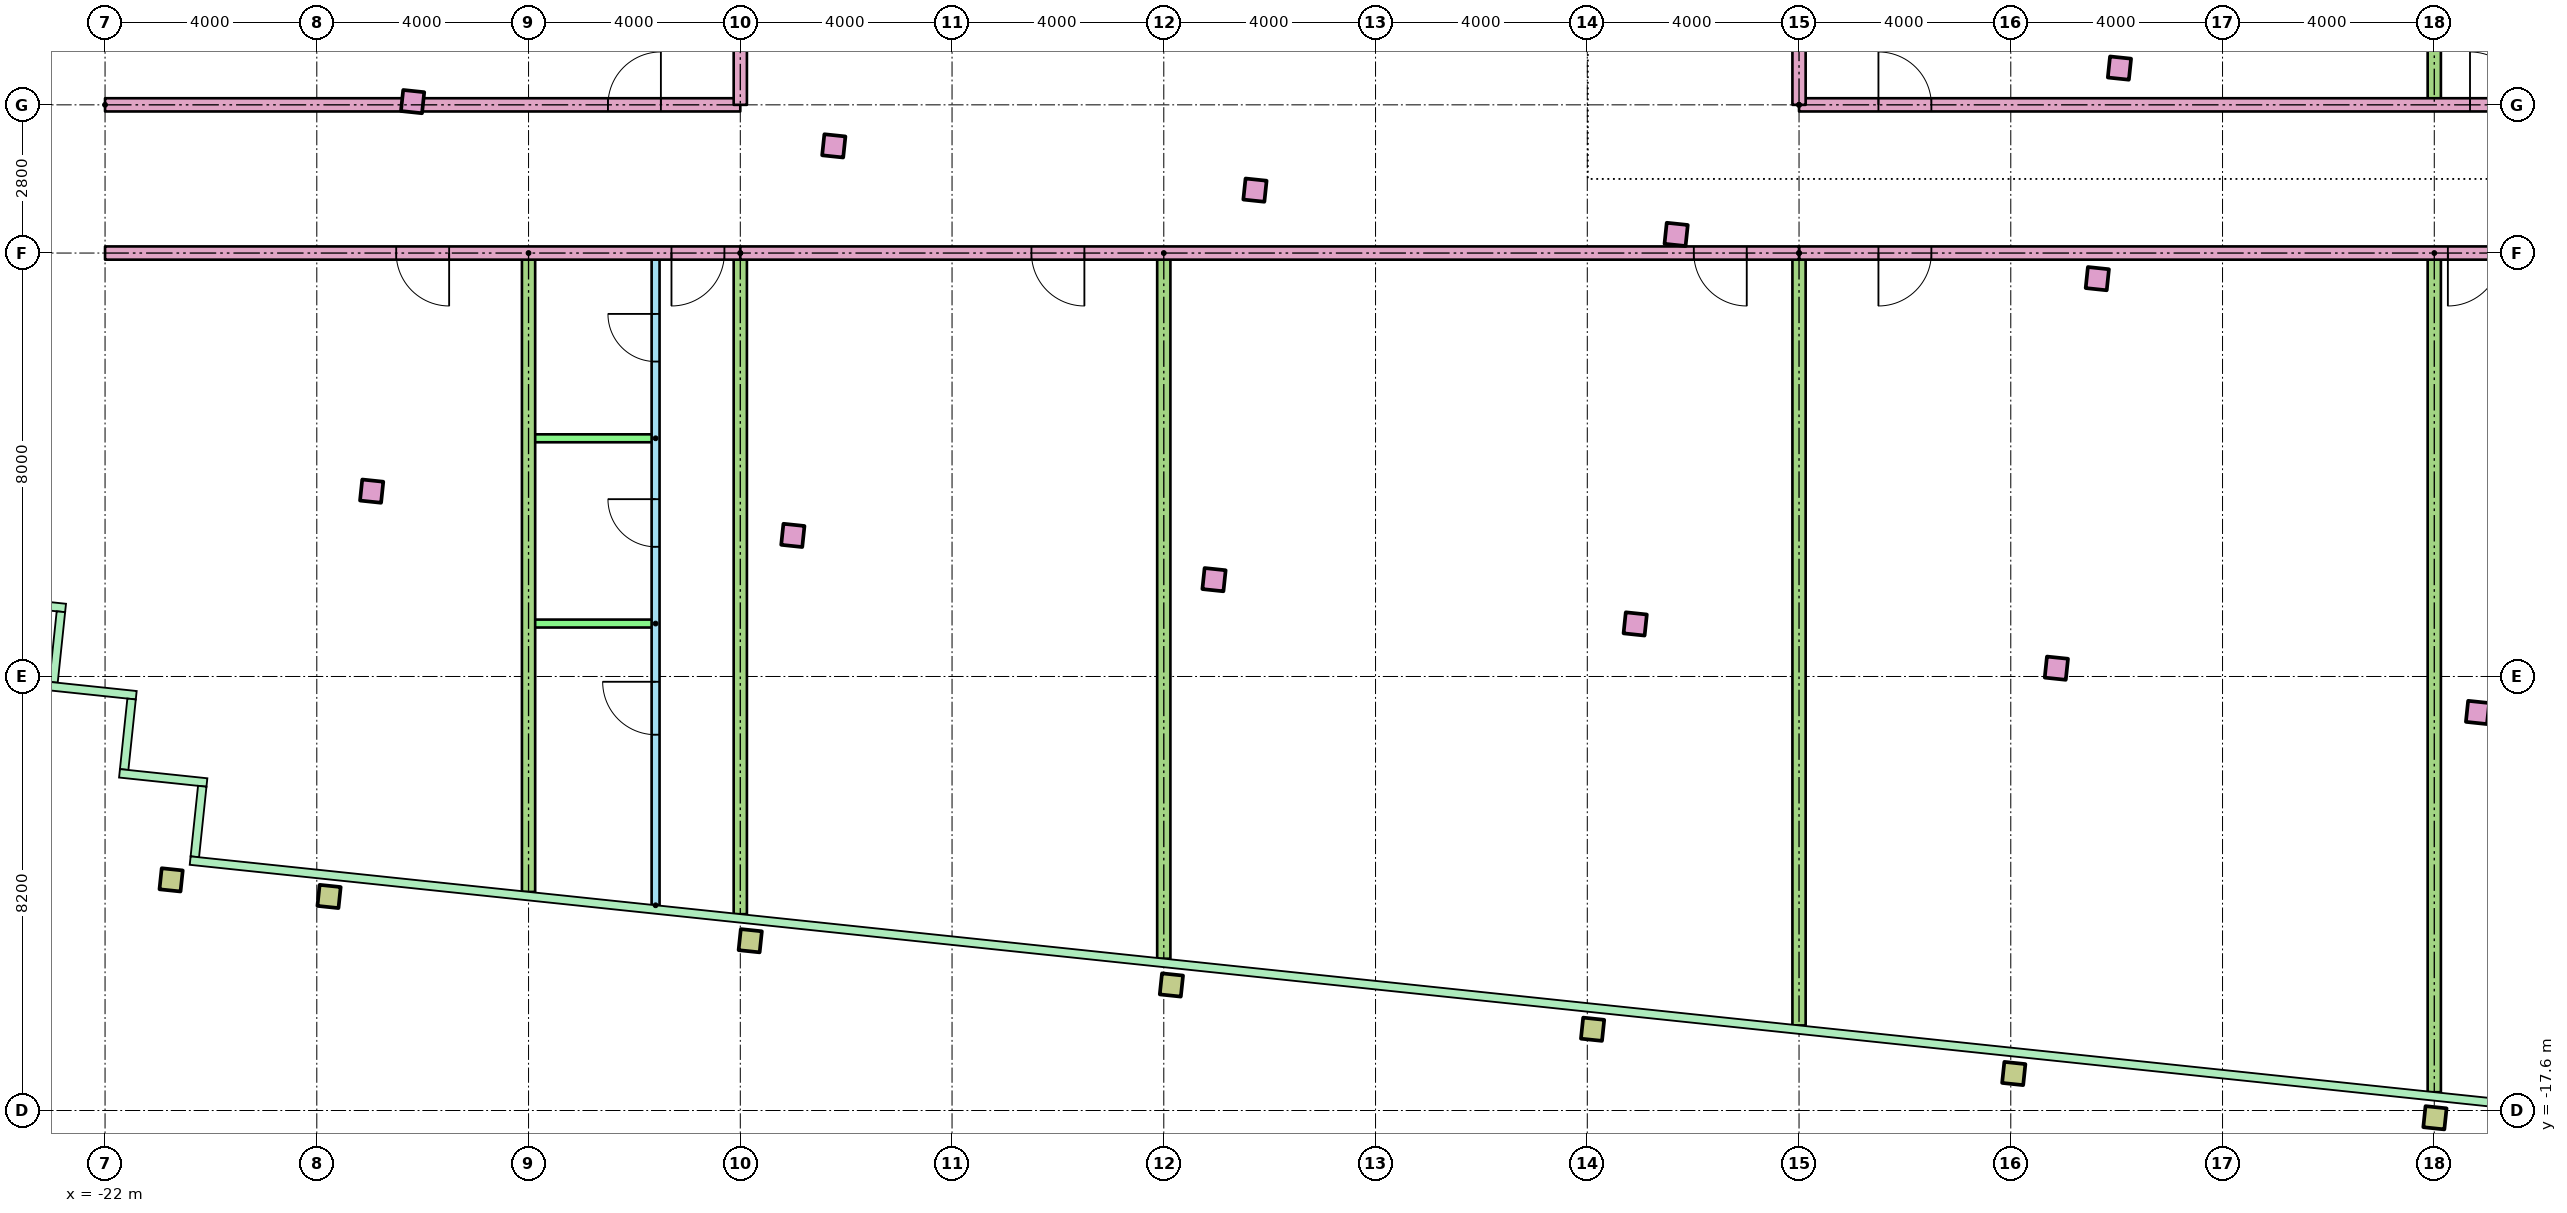
"""IFC4 building model, lengths in metres.
Left out: names, types, materials, properties, quantities, classifications, styles, units other than length and angle.
Written with IfcOpenShell. Run it as: python <this file> out.ifc"""

import sys

from ifc_helpers import new_model, si_unit, direction, frame, frame_2d, origin, origin_2d, place, context, subcontext, project, spatial, rectangle, hollow_rectangle, extrude, element, fill, save


model = new_model("IFC4")
c1 = context("Model", 3, precision=1e-05, world=origin(), true_north=direction((0.0, 1.0)))
c2 = subcontext(c1, "Body", "Model", "MODEL_VIEW")
j1 = project(units=[si_unit("LENGTHUNIT", "METRE"), si_unit("PLANEANGLEUNIT", "RADIAN")], contexts=[c1])
p1 = place(None, origin())
s1 = spatial("IfcSite", under=j1, at=p1, CompositionType="ELEMENT")
p2 = place(p1, origin())
s2 = spatial("IfcBuilding", under=s1, at=p2, CompositionType="ELEMENT")
p3 = place(p2, frame((0.0, 0.0, 298.3)))
s3 = spatial("IfcBuildingStorey", under=s2, at=p3, CompositionType="ELEMENT", Elevation=298.3)
for number, where, z_axis, x_axis in (
    (1, (-20.752, -13.243, 0.0), (0.0, 0.0, 1.0), (0.995, -0.105, 0.0)),
    (2, (-17.768, -13.556, 0.0), (0.0, 0.0, 1.0), (0.995, -0.105, 0.0)),
    (3, (-9.812, -14.392, 0.0), (0.0, 0.0, 1.0), (0.995, -0.105, 0.0)),
    (4, (-1.856, -15.229, 0.0), (0.0, 0.0, 1.0), (0.995, -0.105, 0.0)),
    (5, (6.1, -16.065, 0.0), (0.0, 0.0, 1.0), (0.995, -0.105, 0.0)),
    (6, (14.056, -16.901, 0.0), (0.0, 0.0, 1.0), (0.995, -0.105, 0.0)),
    (7, (22.012, -17.737, 0.0), (0.0, 0.0, 1.0), (0.995, -0.105, 0.0)),
):
    element("IfcColumn", number, at=place(p3, frame(where, z_axis=z_axis, x_axis=x_axis)), inside=s3, PredefinedType="COLUMN", context=c2, shape_type="SweptSolid", body=[
        extrude(hollow_rectangle(XDim=0.4, YDim=0.4, WallThickness=0.02, at=origin_2d()), origin(), (0.0, 0.0, 1.0), 3.4),
    ])
for number, where, z_axis, x_axis in (
    (8, (-16.964, -5.898, 0.0), (0.0, 0.0, 1.0), (0.995, -0.105, 0.0)),
    (9, (-9.007, -6.735, 0.0), (0.0, 0.0, 1.0), (0.995, -0.105, 0.0)),
    (10, (-1.051, -7.571, 0.0), (0.0, 0.0, 1.0), (0.995, -0.105, 0.0)),
    (11, (6.905, -8.407, 0.0), (0.0, 0.0, 1.0), (0.995, -0.105, 0.0)),
    (12, (14.861, -9.243, 0.0), (0.0, 0.0, 1.0), (0.995, -0.105, 0.0)),
    (13, (22.817, -10.08, 0.0), (0.0, 0.0, 1.0), (0.995, -0.105, 0.0)),
    (14, (-16.19, 1.461, 0.0), (0.0, 0.0, 1.0), (0.995, -0.105, 0.0)),
    (15, (-8.234, 0.625, 0.0), (0.0, 0.0, 1.0), (0.995, -0.105, 0.0)),
    (16, (-0.278, -0.211, 0.0), (0.0, 0.0, 1.0), (0.995, -0.105, 0.0)),
    (17, (7.678, -1.048, 0.0), (0.0, 0.0, 1.0), (0.995, -0.105, 0.0)),
    (18, (15.635, -1.884, 0.0), (0.0, 0.0, 1.0), (0.995, -0.105, 0.0)),
    (19, (16.053, 2.094, 0.0), (0.0, 0.0, 1.0), (0.995, -0.105, 0.0)),
):
    element("IfcColumn", number, at=place(p3, frame(where, z_axis=z_axis, x_axis=x_axis)), inside=s3, PredefinedType="COLUMN", context=c2, shape_type="SweptSolid", body=[
        extrude(rectangle(XDim=0.4, YDim=0.4, at=origin_2d()), origin(), (0.0, 0.0, 1.0), 3.4),
    ])
p4 = place(p3, frame((-10.0, -1.4, 0.0), z_axis=(0.0, 0.0, 1.0), x_axis=(-1.0, 0.0, 0.0)))
e20 = element("IfcWall", 20, at=p4, inside=s3, PredefinedType="PARTITIONING", context=c2, shape_type="SweptSolid", body=[
    extrude(rectangle(XDim=12.0, YDim=0.25, at=frame_2d((6.0, 0.0))), origin(), (0.0, 0.0, 1.0), 2.6),
])
p5 = place(p4, frame((0.3, 0.0, 0.0)))
e21 = element("IfcOpeningElement", 21, at=p5, cuts=e20, PredefinedType="OPENING", context=c2, shape_type="SweptSolid", body=[
    extrude(rectangle(XDim=1.0, YDim=2.1, at=frame_2d((0.5, 1.05))), frame((0.0, 0.135, 0.0), z_axis=(0.0, -1.0, 0.0), x_axis=(1.0, 0.0, 0.0)), (0.0, 0.0, 1.0), 0.27),
])
p6 = place(p4, frame((5.5, 0.0, 0.0)))
e22 = element("IfcOpeningElement", 22, at=p6, cuts=e20, PredefinedType="OPENING", context=c2, shape_type="SweptSolid", body=[
    extrude(rectangle(XDim=1.0, YDim=2.1, at=frame_2d((0.5, 1.05))), frame((0.0, 0.135, 0.0), z_axis=(0.0, -1.0, 0.0), x_axis=(1.0, 0.0, 0.0)), (0.0, 0.0, 1.0), 0.27),
])
p7 = place(p3, frame((-11.6, -13.723, 0.0), z_axis=(0.0, 0.0, 1.0), x_axis=(0.0, 1.0, 0.0)))
e23 = element("IfcWall", 23, at=p7, inside=s3, PredefinedType="PARTITIONING", context=c2, shape_type="SweptSolid", body=[
    extrude(rectangle(XDim=12.323, YDim=0.15, at=frame_2d((6.162, 0.0))), origin(), (0.0, 0.0, 1.0), 2.6),
])
p8 = place(p7, frame((10.273, 0.0, 0.0)))
e24 = element("IfcOpeningElement", 24, at=p8, cuts=e23, PredefinedType="OPENING", context=c2, shape_type="SweptSolid", body=[
    extrude(rectangle(XDim=0.9, YDim=2.1, at=frame_2d((0.45, 1.05))), frame((0.0, 0.085, 0.0), z_axis=(0.0, -1.0, 0.0), x_axis=(1.0, 0.0, 0.0)), (0.0, 0.0, 1.0), 0.17),
])
p9 = place(p7, frame((6.773, 0.0, 0.0)))
e25 = element("IfcOpeningElement", 25, at=p9, cuts=e23, PredefinedType="OPENING", context=c2, shape_type="SweptSolid", body=[
    extrude(rectangle(XDim=0.9, YDim=2.1, at=frame_2d((0.45, 1.05))), frame((0.0, 0.085, 0.0), z_axis=(0.0, -1.0, 0.0), x_axis=(1.0, 0.0, 0.0)), (0.0, 0.0, 1.0), 0.17),
])
p10 = place(p7, frame((3.223, 0.0, 0.0)))
e26 = element("IfcOpeningElement", 26, at=p10, cuts=e23, PredefinedType="OPENING", context=c2, shape_type="SweptSolid", body=[
    extrude(rectangle(XDim=1.0, YDim=2.1, at=frame_2d((0.5, 1.05))), frame((0.0, 0.085, 0.0), z_axis=(0.0, -1.0, 0.0), x_axis=(1.0, 0.0, 0.0)), (0.0, 0.0, 1.0), 0.17),
])
for number, where, z_axis, x_axis in (
    (27, (-11.6, -4.9, 0.0), (0.0, 0.0, 1.0), (-1.0, 0.0, 0.0)),
    (28, (-11.6, -8.4, 0.0), (0.0, 0.0, 1.0), (-1.0, 0.0, 0.0)),
):
    element("IfcWall", number, at=place(p3, frame(where, z_axis=z_axis, x_axis=x_axis)), inside=s3, PredefinedType="PARTITIONING", context=c2, shape_type="SweptSolid", body=[
        extrude(rectangle(XDim=2.4, YDim=0.15, at=frame_2d((1.2, 0.0))), origin(), (0.0, 0.0, 1.0), 2.6),
    ])
p11 = place(p3, frame((-14.0, -1.4, 0.0), z_axis=(0.0, 0.0, 1.0), x_axis=(0.0, -1.0, 0.0)))
e29 = element("IfcWall", 29, at=p11, inside=s3, PredefinedType="PARTITIONING", context=c2, shape_type="SweptSolid", body=[
    extrude(rectangle(XDim=12.071, YDim=0.25, at=frame_2d((6.035, 0.0))), origin(), (0.0, 0.0, 1.0), 2.6),
])
p12 = place(p3, frame((-10.0, -1.4, 0.0), z_axis=(0.0, 0.0, 1.0), x_axis=(0.0, -1.0, 0.0)))
e30 = element("IfcWall", 30, at=p12, inside=s3, PredefinedType="PARTITIONING", context=c2, shape_type="SweptSolid", body=[
    extrude(rectangle(XDim=12.491, YDim=0.25, at=frame_2d((6.246, 0.0))), origin(), (0.0, 0.0, 1.0), 2.6),
])
p13 = place(p3, frame((-22.0, 1.4, 0.0)))
e31 = element("IfcWall", 31, at=p13, inside=s3, PredefinedType="PARTITIONING", context=c2, shape_type="SweptSolid", body=[
    extrude(rectangle(XDim=12.0, YDim=0.25, at=frame_2d((6.0, 0.0))), origin(), (0.0, 0.0, 1.0), 2.6),
])
p14 = place(p13, frame((9.5, 0.0, 0.0)))
e32 = element("IfcOpeningElement", 32, at=p14, cuts=e31, PredefinedType="OPENING", context=c2, shape_type="SweptSolid", body=[
    extrude(rectangle(XDim=1.0, YDim=2.1, at=frame_2d((0.5, 1.05))), frame((0.0, 0.135, 0.0), z_axis=(0.0, -1.0, 0.0), x_axis=(1.0, 0.0, 0.0)), (0.0, 0.0, 1.0), 0.27),
])
p15 = place(p3, frame((25.0, -1.4, 0.0), z_axis=(0.0, 0.0, 1.0), x_axis=(-1.0, 0.0, 0.0)))
e33 = element("IfcWall", 33, at=p15, inside=s3, PredefinedType="PARTITIONING", context=c2, shape_type="SweptSolid", body=[
    extrude(rectangle(XDim=15.0, YDim=0.25, at=frame_2d((7.5, 0.0))), origin(), (0.0, 0.0, 1.0), 2.6),
])
p16 = place(p15, frame((12.5, 0.0, 0.0)))
e34 = element("IfcOpeningElement", 34, at=p16, cuts=e33, PredefinedType="OPENING", context=c2, shape_type="SweptSolid", body=[
    extrude(rectangle(XDim=1.0, YDim=2.1, at=frame_2d((0.5, 1.05))), frame((0.0, 0.135, 0.0), z_axis=(0.0, -1.0, 0.0), x_axis=(1.0, 0.0, 0.0)), (0.0, 0.0, 1.0), 0.27),
])
p17 = place(p15, frame((1.743, 0.0, 0.0)))
e35 = element("IfcOpeningElement", 35, at=p17, cuts=e33, PredefinedType="OPENING", context=c2, shape_type="SweptSolid", body=[
    extrude(rectangle(XDim=1.0, YDim=2.1, at=frame_2d((0.5, 1.05))), frame((0.0, 0.135, 0.0), z_axis=(0.0, -1.0, 0.0), x_axis=(1.0, 0.0, 0.0)), (0.0, 0.0, 1.0), 0.27),
])
p18 = place(p3, frame((10.0, -1.4, 0.0), z_axis=(0.0, 0.0, 1.0), x_axis=(0.0, -1.0, 0.0)))
e36 = element("IfcWall", 36, at=p18, inside=s3, PredefinedType="PARTITIONING", context=c2, shape_type="SweptSolid", body=[
    extrude(rectangle(XDim=14.593, YDim=0.25, at=frame_2d((7.297, 0.0))), origin(), (0.0, 0.0, 1.0), 2.6),
])
p19 = place(p3, frame((22.0, -1.4, 0.0), z_axis=(0.0, 0.0, 1.0), x_axis=(0.0, -1.0, 0.0)))
e37 = element("IfcWall", 37, at=p19, inside=s3, PredefinedType="PARTITIONING", context=c2, shape_type="SweptSolid", body=[
    extrude(rectangle(XDim=15.854, YDim=0.25, at=frame_2d((7.927, 0.0))), origin(), (0.0, 0.0, 1.0), 2.6),
])
p20 = place(p3, frame((10.0, 1.4, 0.0)))
e38 = element("IfcWall", 38, at=p20, inside=s3, PredefinedType="PARTITIONING", context=c2, shape_type="SweptSolid", body=[
    extrude(rectangle(XDim=15.0, YDim=0.25, at=frame_2d((7.5, 0.0))), origin(), (0.0, 0.0, 1.0), 2.6),
])
p21 = place(p20, frame((1.5, 0.0, 0.0)))
e39 = element("IfcOpeningElement", 39, at=p21, cuts=e38, PredefinedType="OPENING", context=c2, shape_type="SweptSolid", body=[
    extrude(rectangle(XDim=1.0, YDim=2.1, at=frame_2d((0.5, 1.05))), frame((0.0, 0.135, 0.0), z_axis=(0.0, -1.0, 0.0), x_axis=(1.0, 0.0, 0.0)), (0.0, 0.0, 1.0), 0.27),
])
p22 = place(p20, frame((12.675, 0.0, 0.0)))
e40 = element("IfcOpeningElement", 40, at=p22, cuts=e38, PredefinedType="OPENING", context=c2, shape_type="SweptSolid", body=[
    extrude(rectangle(XDim=1.0, YDim=2.1, at=frame_2d((0.5, 1.05))), frame((0.0, 0.135, 0.0), z_axis=(0.0, -1.0, 0.0), x_axis=(1.0, 0.0, 0.0)), (0.0, 0.0, 1.0), 0.27),
])
p23 = place(p3, frame((22.0, 18.584, 0.0), z_axis=(0.0, 0.0, 1.0), x_axis=(0.0, -1.0, 0.0)))
e41 = element("IfcWall", 41, at=p23, inside=s3, PredefinedType="PARTITIONING", context=c2, shape_type="SweptSolid", body=[
    extrude(rectangle(XDim=17.184, YDim=0.25, at=frame_2d((8.592, 0.0))), origin(), (0.0, 0.0, 1.0), 2.6),
])
p24 = place(p3, frame((-2.0, -1.4, 0.0), z_axis=(0.0, 0.0, 1.0), x_axis=(0.0, -1.0, 0.0)))
e42 = element("IfcWall", 42, at=p24, inside=s3, PredefinedType="PARTITIONING", context=c2, shape_type="SweptSolid", body=[
    extrude(rectangle(XDim=13.332, YDim=0.25, at=frame_2d((6.666, 0.0))), origin(), (0.0, 0.0, 1.0), 2.6),
])
p25 = place(p3, frame((10.0, -1.4, 0.0), z_axis=(0.0, 0.0, 1.0), x_axis=(-1.0, 0.0, 0.0)))
e43 = element("IfcWall", 43, at=p25, inside=s3, PredefinedType="PARTITIONING", context=c2, shape_type="SweptSolid", body=[
    extrude(rectangle(XDim=20.0, YDim=0.25, at=frame_2d((10.0, 0.0))), origin(), (0.0, 0.0, 1.0), 2.6),
])
p26 = place(p25, frame((13.5, 0.0, 0.0)))
e44 = element("IfcOpeningElement", 44, at=p26, cuts=e43, PredefinedType="OPENING", context=c2, shape_type="SweptSolid", body=[
    extrude(rectangle(XDim=1.0, YDim=2.1, at=frame_2d((0.5, 1.05))), frame((0.0, 0.135, 0.0), z_axis=(0.0, -1.0, 0.0), x_axis=(1.0, 0.0, 0.0)), (0.0, 0.0, 1.0), 0.27),
])
p27 = place(p25, frame((0.988, 0.0, 0.0)))
e45 = element("IfcOpeningElement", 45, at=p27, cuts=e43, PredefinedType="OPENING", context=c2, shape_type="SweptSolid", body=[
    extrude(rectangle(XDim=1.0, YDim=2.1, at=frame_2d((0.5, 1.05))), frame((0.0, 0.135, 0.0), z_axis=(0.0, -1.0, 0.0), x_axis=(1.0, 0.0, 0.0)), (0.0, 0.0, 1.0), 0.27),
])
for number, where, z_axis, x_axis in (
    (46, (-10.0, 3.0, 0.0), (0.0, 0.0, 1.0), (0.0, -1.0, 0.0)),
    (47, (10.0, 1.4, 0.0), (0.0, 0.0, 1.0), (0.0, 1.0, 0.0)),
):
    element("IfcWall", number, at=place(p3, frame(where, z_axis=z_axis, x_axis=x_axis)), inside=s3, PredefinedType="PARTITIONING", context=c2, shape_type="SweptSolid", body=[
        extrude(rectangle(XDim=1.6, YDim=0.25, at=frame_2d((0.8, 0.0))), origin(), (0.0, 0.0, 1.0), 2.6),
    ])
p28 = place(p8, origin())
e48 = element("IfcDoor", 48, at=p28, inside=s3, OperationType="SINGLE_SWING_RIGHT", PredefinedType="DOOR", context=c2, shape_type="SweptSolid", body=[
    extrude(rectangle(XDim=0.9, YDim=2.1, at=frame_2d((0.45, 1.05))), frame((0.0, 0.025, 0.0), z_axis=(0.0, -1.0, 0.0), x_axis=(1.0, 0.0, 0.0)), (0.0, 0.0, 1.0), 0.05),
])
fill(e24, e48)
p29 = place(p9, origin())
e49 = element("IfcDoor", 49, at=p29, inside=s3, OperationType="SINGLE_SWING_RIGHT", PredefinedType="DOOR", context=c2, shape_type="SweptSolid", body=[
    extrude(rectangle(XDim=0.9, YDim=2.1, at=frame_2d((0.45, 1.05))), frame((0.0, 0.025, 0.0), z_axis=(0.0, -1.0, 0.0), x_axis=(1.0, 0.0, 0.0)), (0.0, 0.0, 1.0), 0.05),
])
fill(e25, e49)
p30 = place(p10, origin())
e50 = element("IfcDoor", 50, at=p30, inside=s3, OperationType="SINGLE_SWING_RIGHT", PredefinedType="DOOR", context=c2, shape_type="SweptSolid", body=[
    extrude(rectangle(XDim=1.0, YDim=2.1, at=frame_2d((0.5, 1.05))), frame((0.0, 0.025, 0.0), z_axis=(0.0, -1.0, 0.0), x_axis=(1.0, 0.0, 0.0)), (0.0, 0.0, 1.0), 0.05),
])
fill(e26, e50)
p31 = place(p5, origin())
e51 = element("IfcDoor", 51, at=p31, inside=s3, OperationType="SINGLE_SWING_RIGHT", PredefinedType="DOOR", context=c2, shape_type="SweptSolid", body=[
    extrude(rectangle(XDim=1.0, YDim=2.1, at=frame_2d((0.5, 1.05))), frame((0.0, 0.025, 0.0), z_axis=(0.0, -1.0, 0.0), x_axis=(1.0, 0.0, 0.0)), (0.0, 0.0, 1.0), 0.05),
])
fill(e21, e51)
p32 = place(p6, origin())
e52 = element("IfcDoor", 52, at=p32, inside=s3, OperationType="SINGLE_SWING_LEFT", PredefinedType="DOOR", context=c2, shape_type="SweptSolid", body=[
    extrude(rectangle(XDim=1.0, YDim=2.1, at=frame_2d((0.5, 1.05))), frame((0.0, 0.025, 0.0), z_axis=(0.0, -1.0, 0.0), x_axis=(1.0, 0.0, 0.0)), (0.0, 0.0, 1.0), 0.05),
])
fill(e22, e52)
p33 = place(p14, origin())
e53 = element("IfcDoor", 53, at=p33, inside=s3, OperationType="SINGLE_SWING_RIGHT", PredefinedType="DOOR", context=c2, shape_type="SweptSolid", body=[
    extrude(rectangle(XDim=1.0, YDim=2.1, at=frame_2d((0.5, 1.05))), frame((0.0, 0.025, 0.0), z_axis=(0.0, -1.0, 0.0), x_axis=(1.0, 0.0, 0.0)), (0.0, 0.0, 1.0), 0.05),
])
fill(e32, e53)
p34 = place(p16, origin())
e54 = element("IfcDoor", 54, at=p34, inside=s3, OperationType="SINGLE_SWING_RIGHT", PredefinedType="DOOR", context=c2, shape_type="SweptSolid", body=[
    extrude(rectangle(XDim=1.0, YDim=2.1, at=frame_2d((0.5, 1.05))), frame((0.0, 0.025, 0.0), z_axis=(0.0, -1.0, 0.0), x_axis=(1.0, 0.0, 0.0)), (0.0, 0.0, 1.0), 0.05),
])
fill(e34, e54)
p35 = place(p17, origin())
e55 = element("IfcDoor", 55, at=p35, inside=s3, OperationType="SINGLE_SWING_RIGHT", PredefinedType="DOOR", context=c2, shape_type="SweptSolid", body=[
    extrude(rectangle(XDim=1.0, YDim=2.1, at=frame_2d((0.5, 1.05))), frame((0.0, 0.025, 0.0), z_axis=(0.0, -1.0, 0.0), x_axis=(1.0, 0.0, 0.0)), (0.0, 0.0, 1.0), 0.05),
])
fill(e35, e55)
p36 = place(p21, origin())
e56 = element("IfcDoor", 56, at=p36, inside=s3, OperationType="SINGLE_SWING_LEFT", PredefinedType="DOOR", context=c2, shape_type="SweptSolid", body=[
    extrude(rectangle(XDim=1.0, YDim=2.1, at=frame_2d((0.5, 1.05))), frame((0.0, 0.025, 0.0), z_axis=(0.0, -1.0, 0.0), x_axis=(1.0, 0.0, 0.0)), (0.0, 0.0, 1.0), 0.05),
])
fill(e39, e56)
p37 = place(p22, origin())
e57 = element("IfcDoor", 57, at=p37, inside=s3, OperationType="SINGLE_SWING_LEFT", PredefinedType="DOOR", context=c2, shape_type="SweptSolid", body=[
    extrude(rectangle(XDim=1.0, YDim=2.1, at=frame_2d((0.5, 1.05))), frame((0.0, 0.025, 0.0), z_axis=(0.0, -1.0, 0.0), x_axis=(1.0, 0.0, 0.0)), (0.0, 0.0, 1.0), 0.05),
])
fill(e40, e57)
p38 = place(p26, origin())
e58 = element("IfcDoor", 58, at=p38, inside=s3, OperationType="SINGLE_SWING_LEFT", PredefinedType="DOOR", context=c2, shape_type="SweptSolid", body=[
    extrude(rectangle(XDim=1.0, YDim=2.1, at=frame_2d((0.5, 1.05))), frame((0.0, 0.025, 0.0), z_axis=(0.0, -1.0, 0.0), x_axis=(1.0, 0.0, 0.0)), (0.0, 0.0, 1.0), 0.05),
])
fill(e44, e58)
p39 = place(p27, origin())
e59 = element("IfcDoor", 59, at=p39, inside=s3, OperationType="SINGLE_SWING_LEFT", PredefinedType="DOOR", context=c2, shape_type="SweptSolid", body=[
    extrude(rectangle(XDim=1.0, YDim=2.1, at=frame_2d((0.5, 1.05))), frame((0.0, 0.025, 0.0), z_axis=(0.0, -1.0, 0.0), x_axis=(1.0, 0.0, 0.0)), (0.0, 0.0, 1.0), 0.05),
])
fill(e45, e59)
save(model, sys.argv[1])
